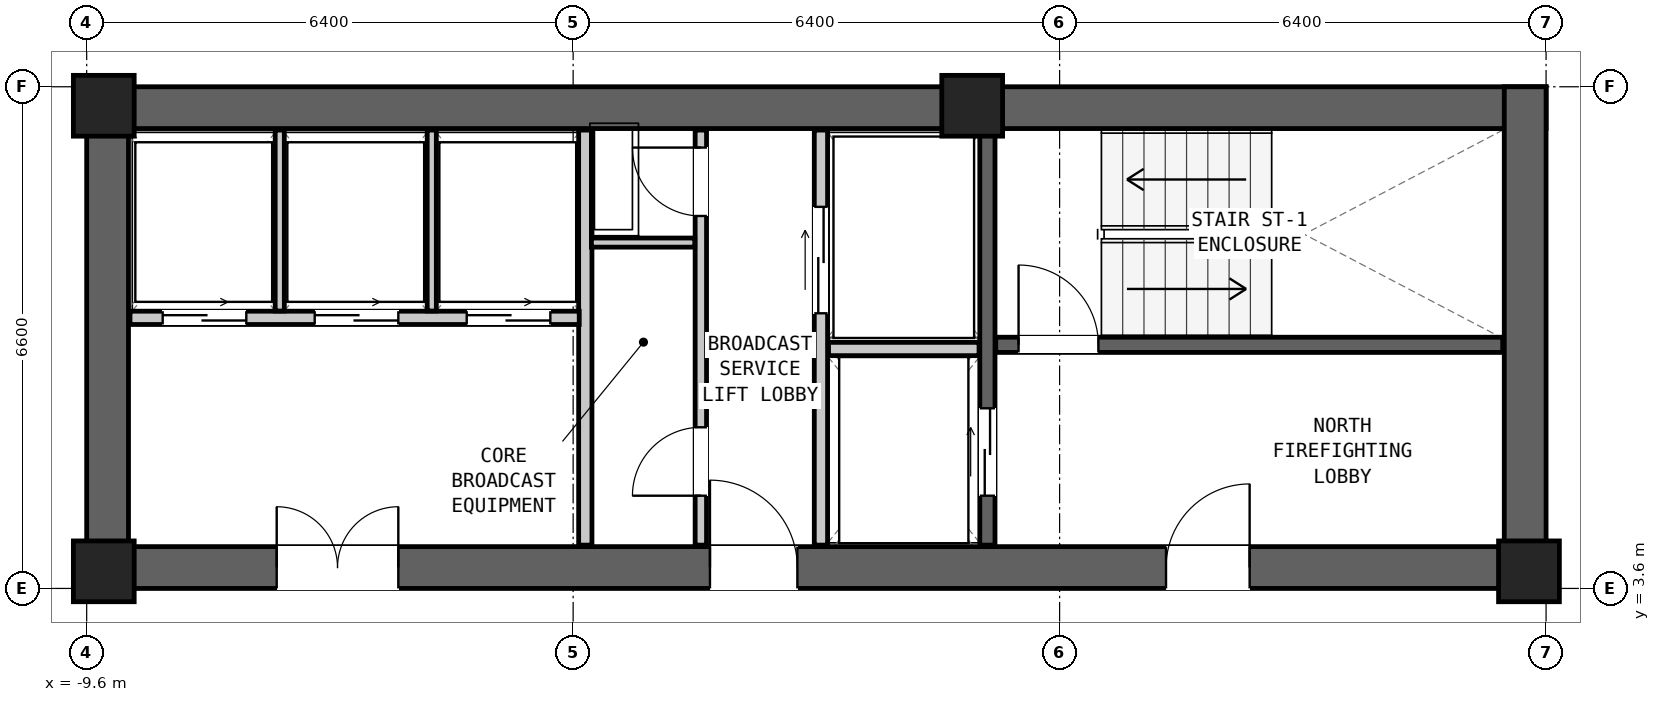
"""IFC4 building model, lengths in metres.
Left out: names, types, materials, properties, quantities, classifications, styles, units other than length and angle.
Written with IfcOpenShell. Run it as: python <this file> out.ifc"""

import sys

from ifc_helpers import new_model, si_unit, direction, frame, frame_2d, origin, origin_2d, place, context, subcontext, project, spatial, rectangle, extrude, element, fill, save


model = new_model("IFC4")
c1 = context("Model", 3, precision=1e-05, world=origin(), true_north=direction((0.0, 1.0)))
c2 = subcontext(c1, "Body", "Model", "MODEL_VIEW")
j1 = project(units=[si_unit("LENGTHUNIT", "METRE"), si_unit("PLANEANGLEUNIT", "RADIAN")], contexts=[c1])
p1 = place(None, origin())
s1 = spatial("IfcSite", under=j1, at=p1, CompositionType="ELEMENT")
p2 = place(p1, origin())
s2 = spatial("IfcBuilding", under=s1, at=p2, CompositionType="ELEMENT")
p3 = place(p2, frame((0.0, 0.0, 93.85)))
s3 = spatial("IfcBuildingStorey", under=s2, at=p3, CompositionType="ELEMENT", Elevation=93.85)
p4 = place(p3, frame((-9.6, 9.925, 0.0), z_axis=(0.0, 0.0, 1.0), x_axis=(1.0, 0.0, 0.0)))
e1 = element("IfcWall", 1, at=p4, inside=s3, PredefinedType="SHEAR", context=c2, shape_type="SweptSolid", body=[
    extrude(rectangle(XDim=19.2, YDim=0.55, at=frame_2d((9.6, 0.0))), origin(), (0.0, 0.0, 1.0), 3.05),
])
p5 = place(p3, frame((-9.6, 3.875, 0.0), z_axis=(0.0, 0.0, 1.0), x_axis=(1.0, 0.0, 0.0)))
e2 = element("IfcWall", 2, at=p5, inside=s3, PredefinedType="SHEAR", context=c2, shape_type="SweptSolid", body=[
    extrude(rectangle(XDim=19.2, YDim=0.55, at=frame_2d((9.6, 0.0))), origin(), (0.0, 0.0, 1.0), 3.05),
])
p6 = place(p5, frame((14.2, 0.0, 0.0)))
e3 = element("IfcOpeningElement", 3, at=p6, cuts=e2, PredefinedType="OPENING", context=c2, shape_type="SweptSolid", body=[
    extrude(rectangle(XDim=1.1, YDim=2.08, at=frame_2d((0.55, 1.04))), frame((0.0, 0.287, 0.0), z_axis=(0.0, -1.0, 0.0), x_axis=(1.0, 0.0, 0.0)), (0.0, 0.0, 1.0), 0.574),
])
p7 = place(p5, frame((8.2, 0.0, 0.0)))
e4 = element("IfcOpeningElement", 4, at=p7, cuts=e2, PredefinedType="OPENING", context=c2, shape_type="SweptSolid", body=[
    extrude(rectangle(XDim=1.15, YDim=2.1, at=frame_2d((0.575, 1.05))), frame((0.0, 0.287, 0.0), z_axis=(0.0, -1.0, 0.0), x_axis=(1.0, 0.0, 0.0)), (0.0, 0.0, 1.0), 0.574),
])
p8 = place(p5, frame((2.5, 0.0, 0.0)))
e5 = element("IfcOpeningElement", 5, at=p8, cuts=e2, PredefinedType="OPENING", context=c2, shape_type="SweptSolid", body=[
    extrude(rectangle(XDim=1.6, YDim=2.12, at=frame_2d((0.8, 1.06))), frame((0.0, 0.287, 0.0), z_axis=(0.0, -1.0, 0.0), x_axis=(1.0, 0.0, 0.0)), (0.0, 0.0, 1.0), 0.574),
])
for number, where, z_axis, x_axis in (
    (6, (-9.325, 3.6, 0.0), (0.0, 0.0, 1.0), (0.0, 1.0, 0.0)),
    (7, (9.325, 3.6, 0.0), (0.0, 0.0, 1.0), (0.0, 1.0, 0.0)),
):
    element("IfcWall", number, at=place(p3, frame(where, z_axis=z_axis, x_axis=x_axis)), inside=s3, PredefinedType="SHEAR", context=c2, shape_type="SweptSolid", body=[
        extrude(rectangle(XDim=6.6, YDim=0.55, at=frame_2d((3.3, 0.0))), origin(), (0.0, 0.0, 1.0), 3.05),
    ])
for number, where, z_axis, x_axis in (
    (8, (-9.375, 9.95, 0.0), (0.0, 0.0, 1.0), (1.0, 0.0, 0.0)),
    (9, (2.05, 9.95, 0.0), (0.0, 0.0, 1.0), (1.0, 0.0, 0.0)),
    (10, (-9.375, 3.825, 0.0), (0.0, 0.0, 1.0), (1.0, 0.0, 0.0)),
    (11, (9.375, 3.825, 0.0), (0.0, 0.0, 1.0), (1.0, 0.0, 0.0)),
):
    element("IfcColumn", number, at=place(p3, frame(where, z_axis=z_axis, x_axis=x_axis)), inside=s3, PredefinedType="COLUMN", context=c2, shape_type="SweptSolid", body=[
        extrude(rectangle(XDim=0.8, YDim=0.8, at=origin_2d()), origin(), (0.0, 0.0, 1.0), 3.05),
    ])
p9 = place(p3, frame((2.36, 6.805, 0.0), z_axis=(0.0, 0.0, 1.0), x_axis=(1.0, 0.0, 0.0)))
e12 = element("IfcWall", 12, at=p9, inside=s3, PredefinedType="SHEAR", context=c2, shape_type="SweptSolid", body=[
    extrude(rectangle(XDim=6.67, YDim=0.2, at=frame_2d((3.335, 0.0))), origin(), (0.0, 0.0, 1.0), 2.83),
])
p10 = place(p9, frame((0.3, 0.0, 0.0)))
e13 = element("IfcOpeningElement", 13, at=p10, cuts=e12, PredefinedType="OPENING", context=c2, shape_type="SweptSolid", body=[
    extrude(rectangle(XDim=1.05, YDim=2.08, at=frame_2d((0.525, 1.04))), frame((0.0, 0.112, 0.0), z_axis=(0.0, -1.0, 0.0), x_axis=(1.0, 0.0, 0.0)), (0.0, 0.0, 1.0), 0.224),
])
p11 = place(p3, frame((2.25, 4.17, 0.0), z_axis=(0.0, 0.0, 1.0), x_axis=(0.0, 1.0, 0.0)))
e14 = element("IfcWall", 14, at=p11, inside=s3, PredefinedType="SHEAR", context=c2, shape_type="SweptSolid", body=[
    extrude(rectangle(XDim=5.46, YDim=0.2, at=frame_2d((2.73, 0.0))), origin(), (0.0, 0.0, 1.0), 2.83),
])
p12 = place(p11, frame((0.65, 0.0, 0.0)))
e15 = element("IfcOpeningElement", 15, at=p12, cuts=e14, PredefinedType="OPENING", context=c2, shape_type="SweptSolid", body=[
    extrude(rectangle(XDim=1.15, YDim=2.08, at=frame_2d((0.575, 1.04))), frame((0.0, 0.112, 0.0), z_axis=(0.0, -1.0, 0.0), x_axis=(1.0, 0.0, 0.0)), (0.0, 0.0, 1.0), 0.224),
])
p13 = place(p3, frame((0.06, 4.17, 0.0), z_axis=(0.0, 0.0, 1.0), x_axis=(0.0, 1.0, 0.0)))
e16 = element("IfcWall", 16, at=p13, inside=s3, PredefinedType="PARTITIONING", context=c2, shape_type="SweptSolid", body=[
    extrude(rectangle(XDim=5.46, YDim=0.175, at=frame_2d((2.73, 0.0))), origin(), (0.0, 0.0, 1.0), 2.83),
])
p14 = place(p13, frame((3.05, 0.0, 0.0)))
e17 = element("IfcOpeningElement", 17, at=p14, cuts=e16, PredefinedType="OPENING", context=c2, shape_type="SweptSolid", body=[
    extrude(rectangle(XDim=1.4, YDim=2.12, at=frame_2d((0.7, 1.06))), frame((0.0, 0.1, 0.0), z_axis=(0.0, -1.0, 0.0), x_axis=(1.0, 0.0, 0.0)), (0.0, 0.0, 1.0), 0.199),
])
p15 = place(p3, frame((0.16, 6.75, 0.0), z_axis=(0.0, 0.0, 1.0), x_axis=(1.0, 0.0, 0.0)))
e18 = element("IfcWall", 18, at=p15, inside=s3, PredefinedType="PARTITIONING", context=c2, shape_type="SweptSolid", body=[
    extrude(rectangle(XDim=1.98, YDim=0.175, at=frame_2d((0.99, 0.0))), origin(), (0.0, 0.0, 1.0), 2.83),
])
p16 = place(p3, frame((-3.04, 4.17, 0.0), z_axis=(0.0, 0.0, 1.0), x_axis=(0.0, 1.0, 0.0)))
e19 = element("IfcWall", 19, at=p16, inside=s3, PredefinedType="PARTITIONING", context=c2, shape_type="SweptSolid", body=[
    extrude(rectangle(XDim=5.46, YDim=0.175, at=frame_2d((2.73, 0.0))), origin(), (0.0, 0.0, 1.0), 2.83),
])
p17 = place(p3, frame((-1.52, 4.17, 0.0), z_axis=(0.0, 0.0, 1.0), x_axis=(0.0, 1.0, 0.0)))
e20 = element("IfcWall", 20, at=p17, inside=s3, PredefinedType="PARTITIONING", context=c2, shape_type="SweptSolid", body=[
    extrude(rectangle(XDim=5.46, YDim=0.15, at=frame_2d((2.73, 0.0))), origin(), (0.0, 0.0, 1.0), 2.83),
])
p18 = place(p17, frame((4.33, 0.0, 0.0)))
e21 = element("IfcOpeningElement", 21, at=p18, cuts=e20, PredefinedType="OPENING", context=c2, shape_type="SweptSolid", body=[
    extrude(rectangle(XDim=0.9, YDim=2.05, at=frame_2d((0.45, 1.025))), frame((0.0, 0.087, 0.0), z_axis=(0.0, -1.0, 0.0), x_axis=(1.0, 0.0, 0.0)), (0.0, 0.0, 1.0), 0.174),
])
p19 = place(p17, frame((0.65, 0.0, 0.0)))
e22 = element("IfcOpeningElement", 22, at=p19, cuts=e20, PredefinedType="OPENING", context=c2, shape_type="SweptSolid", body=[
    extrude(rectangle(XDim=0.9, YDim=2.05, at=frame_2d((0.45, 1.025))), frame((0.0, 0.087, 0.0), z_axis=(0.0, -1.0, 0.0), x_axis=(1.0, 0.0, 0.0)), (0.0, 0.0, 1.0), 0.174),
])
p20 = place(p3, frame((-2.96, 8.15, 0.0), z_axis=(0.0, 0.0, 1.0), x_axis=(1.0, 0.0, 0.0)))
e23 = element("IfcWall", 23, at=p20, inside=s3, PredefinedType="PARTITIONING", context=c2, shape_type="SweptSolid", body=[
    extrude(rectangle(XDim=1.36, YDim=0.12, at=frame_2d((0.68, 0.0))), origin(), (0.0, 0.0, 1.0), 2.83),
])
p21 = place(p3, frame((-9.03, 7.16, 0.0), z_axis=(0.0, 0.0, 1.0), x_axis=(1.0, 0.0, 0.0)))
e24 = element("IfcWall", 24, at=p21, inside=s3, PredefinedType="PARTITIONING", context=c2, shape_type="SweptSolid", body=[
    extrude(rectangle(XDim=5.91, YDim=0.175, at=frame_2d((2.955, 0.0))), origin(), (0.0, 0.0, 1.0), 2.83),
])
p22 = place(p21, frame((0.43, 0.0, 0.0)))
e25 = element("IfcOpeningElement", 25, at=p22, cuts=e24, PredefinedType="OPENING", context=c2, shape_type="SweptSolid", body=[
    extrude(rectangle(XDim=1.1, YDim=2.06, at=frame_2d((0.55, 1.03))), frame((0.0, 0.1, 0.0), z_axis=(0.0, -1.0, 0.0), x_axis=(1.0, 0.0, 0.0)), (0.0, 0.0, 1.0), 0.199),
])
p23 = place(p21, frame((2.43, 0.0, 0.0)))
e26 = element("IfcOpeningElement", 26, at=p23, cuts=e24, PredefinedType="OPENING", context=c2, shape_type="SweptSolid", body=[
    extrude(rectangle(XDim=1.1, YDim=2.06, at=frame_2d((0.55, 1.03))), frame((0.0, 0.1, 0.0), z_axis=(0.0, -1.0, 0.0), x_axis=(1.0, 0.0, 0.0)), (0.0, 0.0, 1.0), 0.199),
])
p24 = place(p21, frame((4.43, 0.0, 0.0)))
e27 = element("IfcOpeningElement", 27, at=p24, cuts=e24, PredefinedType="OPENING", context=c2, shape_type="SweptSolid", body=[
    extrude(rectangle(XDim=1.1, YDim=2.06, at=frame_2d((0.55, 1.03))), frame((0.0, 0.1, 0.0), z_axis=(0.0, -1.0, 0.0), x_axis=(1.0, 0.0, 0.0)), (0.0, 0.0, 1.0), 0.199),
])
for number, where, z_axis, x_axis in (
    (28, (-7.06, 7.25, 0.0), (0.0, 0.0, 1.0), (0.0, 1.0, 0.0)),
    (29, (-5.06, 7.25, 0.0), (0.0, 0.0, 1.0), (0.0, 1.0, 0.0)),
):
    element("IfcWall", number, at=place(p3, frame(where, z_axis=z_axis, x_axis=x_axis)), inside=s3, PredefinedType="PARTITIONING", context=c2, shape_type="SweptSolid", body=[
        extrude(rectangle(XDim=2.38, YDim=0.12, at=frame_2d((1.19, 0.0))), origin(), (0.0, 0.0, 1.0), 2.83),
    ])
p25 = place(p10, origin())
e30 = element("IfcDoor", 30, at=p25, inside=s3, OperationType="SINGLE_SWING_LEFT", PredefinedType="DOOR", context=c2, shape_type="SweptSolid", body=[
    extrude(rectangle(XDim=1.05, YDim=2.08, at=frame_2d((0.525, 1.04))), frame((0.0, 0.025, 0.0), z_axis=(0.0, -1.0, 0.0), x_axis=(1.0, 0.0, 0.0)), (0.0, 0.0, 1.0), 0.05),
])
fill(e13, e30)
p26 = place(p6, origin())
e31 = element("IfcDoor", 31, at=p26, inside=s3, OperationType="SINGLE_SWING_RIGHT", PredefinedType="DOOR", context=c2, shape_type="SweptSolid", body=[
    extrude(rectangle(XDim=1.1, YDim=2.08, at=frame_2d((0.55, 1.04))), frame((0.0, 0.025, 0.0), z_axis=(0.0, -1.0, 0.0), x_axis=(1.0, 0.0, 0.0)), (0.0, 0.0, 1.0), 0.05),
])
fill(e3, e31)
p27 = place(p12, origin())
e32 = element("IfcDoor", 32, at=p27, inside=s3, OperationType="DOUBLE_DOOR_SLIDING", PredefinedType="DOOR", context=c2, shape_type="SweptSolid", body=[
    extrude(rectangle(XDim=1.15, YDim=2.08, at=frame_2d((0.575, 1.04))), frame((0.0, 0.025, 0.0), z_axis=(0.0, -1.0, 0.0), x_axis=(1.0, 0.0, 0.0)), (0.0, 0.0, 1.0), 0.05),
])
fill(e15, e32)
p28 = place(p14, origin())
e33 = element("IfcDoor", 33, at=p28, inside=s3, OperationType="DOUBLE_DOOR_SLIDING", PredefinedType="DOOR", context=c2, shape_type="SweptSolid", body=[
    extrude(rectangle(XDim=1.4, YDim=2.12, at=frame_2d((0.7, 1.06))), frame((0.0, 0.025, 0.0), z_axis=(0.0, -1.0, 0.0), x_axis=(1.0, 0.0, 0.0)), (0.0, 0.0, 1.0), 0.05),
])
fill(e17, e33)
p29 = place(p7, origin())
e34 = element("IfcDoor", 34, at=p29, inside=s3, OperationType="SINGLE_SWING_LEFT", PredefinedType="DOOR", context=c2, shape_type="SweptSolid", body=[
    extrude(rectangle(XDim=1.15, YDim=2.1, at=frame_2d((0.575, 1.05))), frame((0.0, 0.025, 0.0), z_axis=(0.0, -1.0, 0.0), x_axis=(1.0, 0.0, 0.0)), (0.0, 0.0, 1.0), 0.05),
])
fill(e4, e34)
p30 = place(p18, origin())
e35 = element("IfcDoor", 35, at=p30, inside=s3, OperationType="SINGLE_SWING_RIGHT", PredefinedType="DOOR", context=c2, shape_type="SweptSolid", body=[
    extrude(rectangle(XDim=0.9, YDim=2.05, at=frame_2d((0.45, 1.025))), frame((0.0, 0.025, 0.0), z_axis=(0.0, -1.0, 0.0), x_axis=(1.0, 0.0, 0.0)), (0.0, 0.0, 1.0), 0.05),
])
fill(e21, e35)
p31 = place(p19, origin())
e36 = element("IfcDoor", 36, at=p31, inside=s3, OperationType="SINGLE_SWING_LEFT", PredefinedType="DOOR", context=c2, shape_type="SweptSolid", body=[
    extrude(rectangle(XDim=0.9, YDim=2.05, at=frame_2d((0.45, 1.025))), frame((0.0, 0.025, 0.0), z_axis=(0.0, -1.0, 0.0), x_axis=(1.0, 0.0, 0.0)), (0.0, 0.0, 1.0), 0.05),
])
fill(e22, e36)
p32 = place(p22, origin())
e37 = element("IfcDoor", 37, at=p32, inside=s3, OperationType="DOUBLE_DOOR_SLIDING", PredefinedType="DOOR", context=c2, shape_type="SweptSolid", body=[
    extrude(rectangle(XDim=1.1, YDim=2.06, at=frame_2d((0.55, 1.03))), frame((0.0, 0.025, 0.0), z_axis=(0.0, -1.0, 0.0), x_axis=(1.0, 0.0, 0.0)), (0.0, 0.0, 1.0), 0.05),
])
fill(e25, e37)
p33 = place(p23, origin())
e38 = element("IfcDoor", 38, at=p33, inside=s3, OperationType="DOUBLE_DOOR_SLIDING", PredefinedType="DOOR", context=c2, shape_type="SweptSolid", body=[
    extrude(rectangle(XDim=1.1, YDim=2.06, at=frame_2d((0.55, 1.03))), frame((0.0, 0.025, 0.0), z_axis=(0.0, -1.0, 0.0), x_axis=(1.0, 0.0, 0.0)), (0.0, 0.0, 1.0), 0.05),
])
fill(e26, e38)
p34 = place(p24, origin())
e39 = element("IfcDoor", 39, at=p34, inside=s3, OperationType="DOUBLE_DOOR_SLIDING", PredefinedType="DOOR", context=c2, shape_type="SweptSolid", body=[
    extrude(rectangle(XDim=1.1, YDim=2.06, at=frame_2d((0.55, 1.03))), frame((0.0, 0.025, 0.0), z_axis=(0.0, -1.0, 0.0), x_axis=(1.0, 0.0, 0.0)), (0.0, 0.0, 1.0), 0.05),
])
fill(e27, e39)
p35 = place(p8, origin())
e40 = element("IfcDoor", 40, at=p35, inside=s3, OperationType="DOUBLE_DOOR_SINGLE_SWING", PredefinedType="DOOR", context=c2, shape_type="SweptSolid", body=[
    extrude(rectangle(XDim=1.6, YDim=2.12, at=frame_2d((0.8, 1.06))), frame((0.0, 0.025, 0.0), z_axis=(0.0, -1.0, 0.0), x_axis=(1.0, 0.0, 0.0)), (0.0, 0.0, 1.0), 0.05),
])
fill(e5, e40)
save(model, sys.argv[1])
